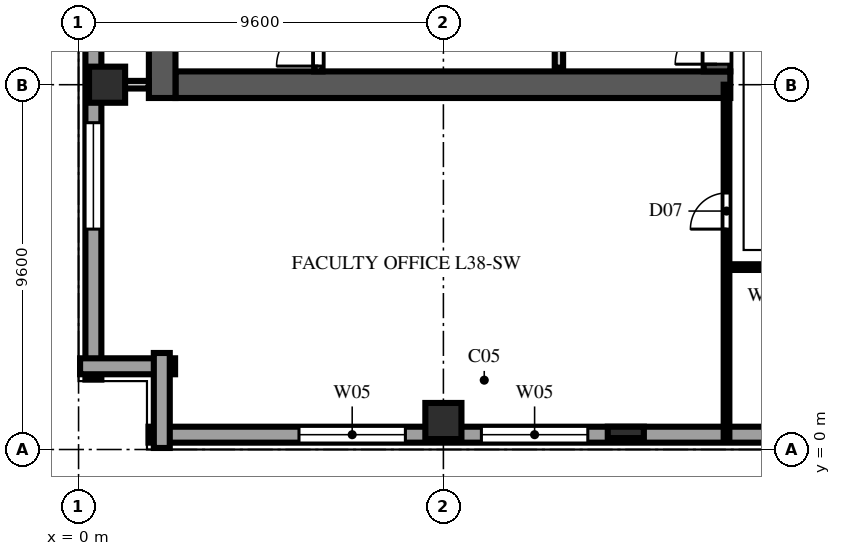
"""IFC4 building model, lengths in metres.
Left out: names, types, materials, properties, quantities, classifications, styles, units other than length and angle.
Written with IfcOpenShell. Run it as: python <this file> out.ifc"""

import sys

from ifc_helpers import new_model, si_unit, direction, frame, frame_2d, origin, origin_2d, place, context, subcontext, project, spatial, rectangle, extrude, element, fill, save


model = new_model("IFC4")
c1 = context("Model", 3, precision=1e-05, world=origin(), true_north=direction((0.0, 1.0)))
c2 = subcontext(c1, "Body", "Model", "MODEL_VIEW")
j1 = project(units=[si_unit("LENGTHUNIT", "METRE"), si_unit("PLANEANGLEUNIT", "RADIAN")], contexts=[c1])
p1 = place(None, origin())
s1 = spatial("IfcSite", under=j1, at=p1, CompositionType="ELEMENT")
p2 = place(p1, origin())
s2 = spatial("IfcBuilding", under=s1, at=p2, CompositionType="ELEMENT")
p3 = place(p2, frame((0.0, 0.0, 150.8)))
s3 = spatial("IfcBuildingStorey", under=s2, at=p3, CompositionType="ELEMENT", Elevation=150.8)
p4 = place(p3, frame((2.55, 9.6, 0.0), z_axis=(0.0, 0.0, 1.0), x_axis=(1.0, 0.0, 0.0)))
e1 = element("IfcWall", 1, at=p4, inside=s3, PredefinedType="SHEAR", context=c2, shape_type="SweptSolid", body=[
    extrude(rectangle(XDim=14.6, YDim=0.7, at=frame_2d((7.3, 0.0))), origin(), (0.0, 0.0, 1.0), 4.94),
])
p5 = place(p3, frame((2.2, 9.25, 0.0), z_axis=(0.0, 0.0, 1.0), x_axis=(0.0, 1.0, 0.0)))
e2 = element("IfcWall", 2, at=p5, inside=s3, PredefinedType="SHEAR", context=c2, shape_type="SweptSolid", body=[
    extrude(rectangle(XDim=39.1, YDim=0.7, at=frame_2d((19.55, 0.0))), origin(), (0.0, 0.0, 1.0), 4.94),
])
p6 = place(p3, frame((16.8, 9.95, 0.0), z_axis=(0.0, 0.0, 1.0), x_axis=(0.0, 1.0, 0.0)))
e3 = element("IfcWall", 3, at=p6, inside=s3, PredefinedType="SHEAR", context=c2, shape_type="SweptSolid", body=[
    extrude(rectangle(XDim=12.45, YDim=0.7, at=frame_2d((6.225, 0.0))), origin(), (0.0, 0.0, 1.0), 4.94),
])
p7 = place(p6, frame((0.19, 0.0, 0.0)))
e4 = element("IfcOpeningElement", 4, at=p7, cuts=e3, PredefinedType="OPENING", context=c2, shape_type="SweptSolid", body=[
    extrude(rectangle(XDim=1.1, YDim=2.2, at=frame_2d((0.55, 1.1))), frame((0.0, 0.362, 0.0), z_axis=(0.0, -1.0, 0.0), x_axis=(1.0, 0.0, 0.0)), (0.0, 0.0, 1.0), 0.724),
])
for number, where, z_axis, x_axis in (
    (5, (0.75, 9.6, 0.0), (0.0, 0.0, 1.0), (1.0, 0.0, 0.0)),
    (6, (9.6, 0.75, 0.0), (0.0, 0.0, 1.0), (1.0, 0.0, 0.0)),
):
    element("IfcColumn", number, at=place(p3, frame(where, z_axis=z_axis, x_axis=x_axis)), inside=s3, PredefinedType="COLUMN", context=c2, shape_type="SweptSolid", body=[
        extrude(rectangle(XDim=0.95, YDim=0.95, at=origin_2d()), origin(), (0.0, 0.0, 1.0), 5.2),
    ])
p8 = place(p3, frame((14.4, 0.45, 0.0), z_axis=(0.0, 0.0, 1.0), x_axis=(1.0, 0.0, 0.0)))
e7 = element("IfcColumn", 7, at=p8, inside=s3, PredefinedType="PILASTER", context=c2, shape_type="SweptSolid", body=[
    extrude(rectangle(XDim=0.95, YDim=0.3, at=origin_2d()), origin(), (0.0, 0.0, 1.0), 5.2),
])
p9 = place(p3, frame((1.84, 0.39, 0.0), z_axis=(0.0, 0.0, 1.0), x_axis=(1.0, 0.0, 0.0)))
e8 = element("IfcWall", 8, at=p9, inside=s3, PredefinedType="SOLIDWALL", context=c2, shape_type="SweptSolid", body=[
    extrude(rectangle(XDim=53.92, YDim=0.42, at=frame_2d((26.96, 0.0))), origin(), (0.0, 0.0, 1.0), 4.94),
])
p10 = place(p9, frame((3.96, 0.0, 0.75)))
e9 = element("IfcOpeningElement", 9, at=p10, cuts=e8, PredefinedType="OPENING", context=c2, shape_type="SweptSolid", body=[
    extrude(rectangle(XDim=2.8, YDim=2.3, at=frame_2d((1.4, 1.15))), frame((0.0, 0.222, 0.0), z_axis=(0.0, -1.0, 0.0), x_axis=(1.0, 0.0, 0.0)), (0.0, 0.0, 1.0), 0.444),
])
p11 = place(p9, frame((8.76, 0.0, 0.75)))
e10 = element("IfcOpeningElement", 10, at=p11, cuts=e8, PredefinedType="OPENING", context=c2, shape_type="SweptSolid", body=[
    extrude(rectangle(XDim=2.8, YDim=2.3, at=frame_2d((1.4, 1.15))), frame((0.0, 0.222, 0.0), z_axis=(0.0, -1.0, 0.0), x_axis=(1.0, 0.0, 0.0)), (0.0, 0.0, 1.0), 0.444),
])
p12 = place(p9, frame((18.36, 0.0, 0.75)))
e11 = element("IfcOpeningElement", 11, at=p12, cuts=e8, PredefinedType="OPENING", context=c2, shape_type="SweptSolid", body=[
    extrude(rectangle(XDim=2.8, YDim=2.3, at=frame_2d((1.4, 1.15))), frame((0.0, 0.222, 0.0), z_axis=(0.0, -1.0, 0.0), x_axis=(1.0, 0.0, 0.0)), (0.0, 0.0, 1.0), 0.444),
])
p13 = place(p9, frame((27.96, 0.0, 0.75)))
e12 = element("IfcOpeningElement", 12, at=p13, cuts=e8, PredefinedType="OPENING", context=c2, shape_type="SweptSolid", body=[
    extrude(rectangle(XDim=2.8, YDim=2.3, at=frame_2d((1.4, 1.15))), frame((0.0, 0.222, 0.0), z_axis=(0.0, -1.0, 0.0), x_axis=(1.0, 0.0, 0.0)), (0.0, 0.0, 1.0), 0.444),
])
p14 = place(p3, frame((0.39, 65.36, 0.0), z_axis=(0.0, 0.0, 1.0), x_axis=(0.0, -1.0, 0.0)))
e13 = element("IfcWall", 13, at=p14, inside=s3, PredefinedType="SOLIDWALL", context=c2, shape_type="SweptSolid", body=[
    extrude(rectangle(XDim=63.52, YDim=0.42, at=frame_2d((31.76, 0.0))), origin(), (0.0, 0.0, 1.0), 4.94),
])
p15 = place(p14, frame((32.76, 0.0, 0.75)))
e14 = element("IfcOpeningElement", 14, at=p15, cuts=e13, PredefinedType="OPENING", context=c2, shape_type="SweptSolid", body=[
    extrude(rectangle(XDim=2.8, YDim=2.3, at=frame_2d((1.4, 1.15))), frame((0.0, 0.222, 0.0), z_axis=(0.0, -1.0, 0.0), x_axis=(1.0, 0.0, 0.0)), (0.0, 0.0, 1.0), 0.444),
])
p16 = place(p14, frame((37.56, 0.0, 0.75)))
e15 = element("IfcOpeningElement", 15, at=p16, cuts=e13, PredefinedType="OPENING", context=c2, shape_type="SweptSolid", body=[
    extrude(rectangle(XDim=2.8, YDim=2.3, at=frame_2d((1.4, 1.15))), frame((0.0, 0.222, 0.0), z_axis=(0.0, -1.0, 0.0), x_axis=(1.0, 0.0, 0.0)), (0.0, 0.0, 1.0), 0.444),
])
p17 = place(p14, frame((42.36, 0.0, 0.75)))
e16 = element("IfcOpeningElement", 16, at=p17, cuts=e13, PredefinedType="OPENING", context=c2, shape_type="SweptSolid", body=[
    extrude(rectangle(XDim=2.8, YDim=2.3, at=frame_2d((1.4, 1.15))), frame((0.0, 0.222, 0.0), z_axis=(0.0, -1.0, 0.0), x_axis=(1.0, 0.0, 0.0)), (0.0, 0.0, 1.0), 0.444),
])
p18 = place(p14, frame((47.16, 0.0, 0.75)))
e17 = element("IfcOpeningElement", 17, at=p18, cuts=e13, PredefinedType="OPENING", context=c2, shape_type="SweptSolid", body=[
    extrude(rectangle(XDim=2.8, YDim=2.3, at=frame_2d((1.4, 1.15))), frame((0.0, 0.222, 0.0), z_axis=(0.0, -1.0, 0.0), x_axis=(1.0, 0.0, 0.0)), (0.0, 0.0, 1.0), 0.444),
])
p19 = place(p14, frame((51.96, 0.0, 0.75)))
e18 = element("IfcOpeningElement", 18, at=p19, cuts=e13, PredefinedType="OPENING", context=c2, shape_type="SweptSolid", body=[
    extrude(rectangle(XDim=2.8, YDim=2.3, at=frame_2d((1.4, 1.15))), frame((0.0, 0.222, 0.0), z_axis=(0.0, -1.0, 0.0), x_axis=(1.0, 0.0, 0.0)), (0.0, 0.0, 1.0), 0.444),
])
p20 = place(p14, frame((56.76, 0.0, 0.75)))
e19 = element("IfcOpeningElement", 19, at=p20, cuts=e13, PredefinedType="OPENING", context=c2, shape_type="SweptSolid", body=[
    extrude(rectangle(XDim=2.8, YDim=2.3, at=frame_2d((1.4, 1.15))), frame((0.0, 0.222, 0.0), z_axis=(0.0, -1.0, 0.0), x_axis=(1.0, 0.0, 0.0)), (0.0, 0.0, 1.0), 0.444),
])
for number, where, z_axis, x_axis in (
    (20, (0.04, 2.19, 0.0), (0.0, 0.0, 1.0), (1.0, 0.0, 0.0)),
    (21, (2.19, 2.54, 0.0), (0.0, 0.0, 1.0), (0.0, -1.0, 0.0)),
):
    element("IfcWall", number, at=place(p3, frame(where, z_axis=z_axis, x_axis=x_axis)), inside=s3, PredefinedType="SOLIDWALL", context=c2, shape_type="SweptSolid", body=[
        extrude(rectangle(XDim=2.5, YDim=0.42, at=frame_2d((1.25, 0.0))), origin(), (0.0, 0.0, 1.0), 4.94),
    ])
p21 = place(p3, frame((6.31, 9.95, 0.0), z_axis=(0.0, 0.0, 1.0), x_axis=(0.0, 1.0, 0.0)))
e22 = element("IfcWall", 22, at=p21, inside=s3, PredefinedType="SOLIDWALL", context=c2, shape_type="SweptSolid", body=[
    extrude(rectangle(XDim=7.81, YDim=0.22, at=frame_2d((3.905, 0.0))), origin(), (0.0, 0.0, 1.0), 4.94),
])
p22 = place(p21, frame((0.14, 0.0, 0.0)))
e23 = element("IfcOpeningElement", 23, at=p22, cuts=e22, PredefinedType="OPENING", context=c2, shape_type="SweptSolid", body=[
    extrude(rectangle(XDim=1.1, YDim=2.2, at=frame_2d((0.55, 1.1))), frame((0.0, 0.122, 0.0), z_axis=(0.0, -1.0, 0.0), x_axis=(1.0, 0.0, 0.0)), (0.0, 0.0, 1.0), 0.244),
])
p23 = place(p3, frame((12.64, 10.05, 0.0), z_axis=(0.0, 0.0, 1.0), x_axis=(0.0, 1.0, 0.0)))
e24 = element("IfcWall", 24, at=p23, inside=s3, PredefinedType="SOLIDWALL", context=c2, shape_type="SweptSolid", body=[
    extrude(rectangle(XDim=7.71, YDim=0.22, at=frame_2d((3.855, 0.0))), origin(), (0.0, 0.0, 1.0), 4.94),
])
p24 = place(p3, frame((0.85, 9.6, 0.0), z_axis=(0.0, 0.0, 1.0), x_axis=(1.0, 0.0, 0.0)))
e25 = element("IfcWall", 25, at=p24, inside=s3, PredefinedType="SOLIDWALL", context=c2, shape_type="SweptSolid", body=[
    extrude(rectangle(XDim=0.995, YDim=0.2, at=frame_2d((0.498, 0.0))), origin(), (0.0, 0.0, 1.0), 4.245),
])
p25 = place(p3, frame((17.05, 4.8, 0.0), z_axis=(0.0, 0.0, 1.0), x_axis=(1.0, 0.0, 0.0)))
e26 = element("IfcWall", 26, at=p25, inside=s3, PredefinedType="PARTITIONING", context=c2, shape_type="SweptSolid", body=[
    extrude(rectangle(XDim=2.15, YDim=0.15, at=frame_2d((1.075, 0.0))), origin(), (0.0, 0.0, 1.0), 4.94),
])
p26 = place(p3, frame((17.05, 0.22, 0.0), z_axis=(0.0, 0.0, 1.0), x_axis=(0.0, 1.0, 0.0)))
e27 = element("IfcWall", 27, at=p26, inside=s3, PredefinedType="PARTITIONING", context=c2, shape_type="SweptSolid", body=[
    extrude(rectangle(XDim=9.38, YDim=0.15, at=frame_2d((4.69, 0.0))), origin(), (0.0, 0.0, 1.0), 4.94),
])
p27 = place(p26, frame((5.58, 0.0, 0.0)))
e28 = element("IfcOpeningElement", 28, at=p27, cuts=e27, PredefinedType="OPENING", context=c2, shape_type="SweptSolid", body=[
    extrude(rectangle(XDim=0.95, YDim=2.15, at=frame_2d((0.475, 1.075))), frame((0.0, 0.087, 0.0), z_axis=(0.0, -1.0, 0.0), x_axis=(1.0, 0.0, 0.0)), (0.0, 0.0, 1.0), 0.174),
])
p28 = place(p10, origin())
e29 = element("IfcWindow", 29, at=p28, inside=s3, PartitioningType="TRIPLE_PANEL_VERTICAL", PredefinedType="WINDOW", context=c2, shape_type="SweptSolid", body=[
    extrude(rectangle(XDim=2.8, YDim=2.3, at=frame_2d((1.4, 1.15))), frame((0.0, 0.11, 0.0), z_axis=(0.0, -1.0, 0.0), x_axis=(1.0, 0.0, 0.0)), (0.0, 0.0, 1.0), 0.06),
])
fill(e9, e29)
p29 = place(p11, origin())
e30 = element("IfcWindow", 30, at=p29, inside=s3, PartitioningType="TRIPLE_PANEL_VERTICAL", PredefinedType="WINDOW", context=c2, shape_type="SweptSolid", body=[
    extrude(rectangle(XDim=2.8, YDim=2.3, at=frame_2d((1.4, 1.15))), frame((0.0, 0.11, 0.0), z_axis=(0.0, -1.0, 0.0), x_axis=(1.0, 0.0, 0.0)), (0.0, 0.0, 1.0), 0.06),
])
fill(e10, e30)
p30 = place(p20, origin())
e31 = element("IfcWindow", 31, at=p30, inside=s3, PartitioningType="TRIPLE_PANEL_VERTICAL", PredefinedType="WINDOW", context=c2, shape_type="SweptSolid", body=[
    extrude(rectangle(XDim=2.8, YDim=2.3, at=frame_2d((1.4, 1.15))), frame((0.0, 0.11, 0.0), z_axis=(0.0, -1.0, 0.0), x_axis=(1.0, 0.0, 0.0)), (0.0, 0.0, 1.0), 0.06),
])
fill(e19, e31)
p31 = place(p22, origin())
e32 = element("IfcDoor", 32, at=p31, inside=s3, OperationType="SINGLE_SWING_LEFT", PredefinedType="DOOR", context=c2, shape_type="SweptSolid", body=[
    extrude(rectangle(XDim=1.1, YDim=2.2, at=frame_2d((0.55, 1.1))), frame((0.0, 0.025, 0.0), z_axis=(0.0, -1.0, 0.0), x_axis=(1.0, 0.0, 0.0)), (0.0, 0.0, 1.0), 0.05),
])
fill(e23, e32)
p32 = place(p7, origin())
e33 = element("IfcDoor", 33, at=p32, inside=s3, OperationType="SINGLE_SWING_LEFT", PredefinedType="DOOR", context=c2, shape_type="SweptSolid", body=[
    extrude(rectangle(XDim=1.1, YDim=2.2, at=frame_2d((0.55, 1.1))), frame((0.0, 0.025, 0.0), z_axis=(0.0, -1.0, 0.0), x_axis=(1.0, 0.0, 0.0)), (0.0, 0.0, 1.0), 0.05),
])
fill(e4, e33)
p33 = place(p27, origin())
e34 = element("IfcDoor", 34, at=p33, inside=s3, OperationType="SINGLE_SWING_LEFT", PredefinedType="DOOR", context=c2, shape_type="SweptSolid", body=[
    extrude(rectangle(XDim=0.95, YDim=2.15, at=frame_2d((0.475, 1.075))), frame((0.0, 0.025, 0.0), z_axis=(0.0, -1.0, 0.0), x_axis=(1.0, 0.0, 0.0)), (0.0, 0.0, 1.0), 0.05),
])
fill(e28, e34)
save(model, sys.argv[1])
